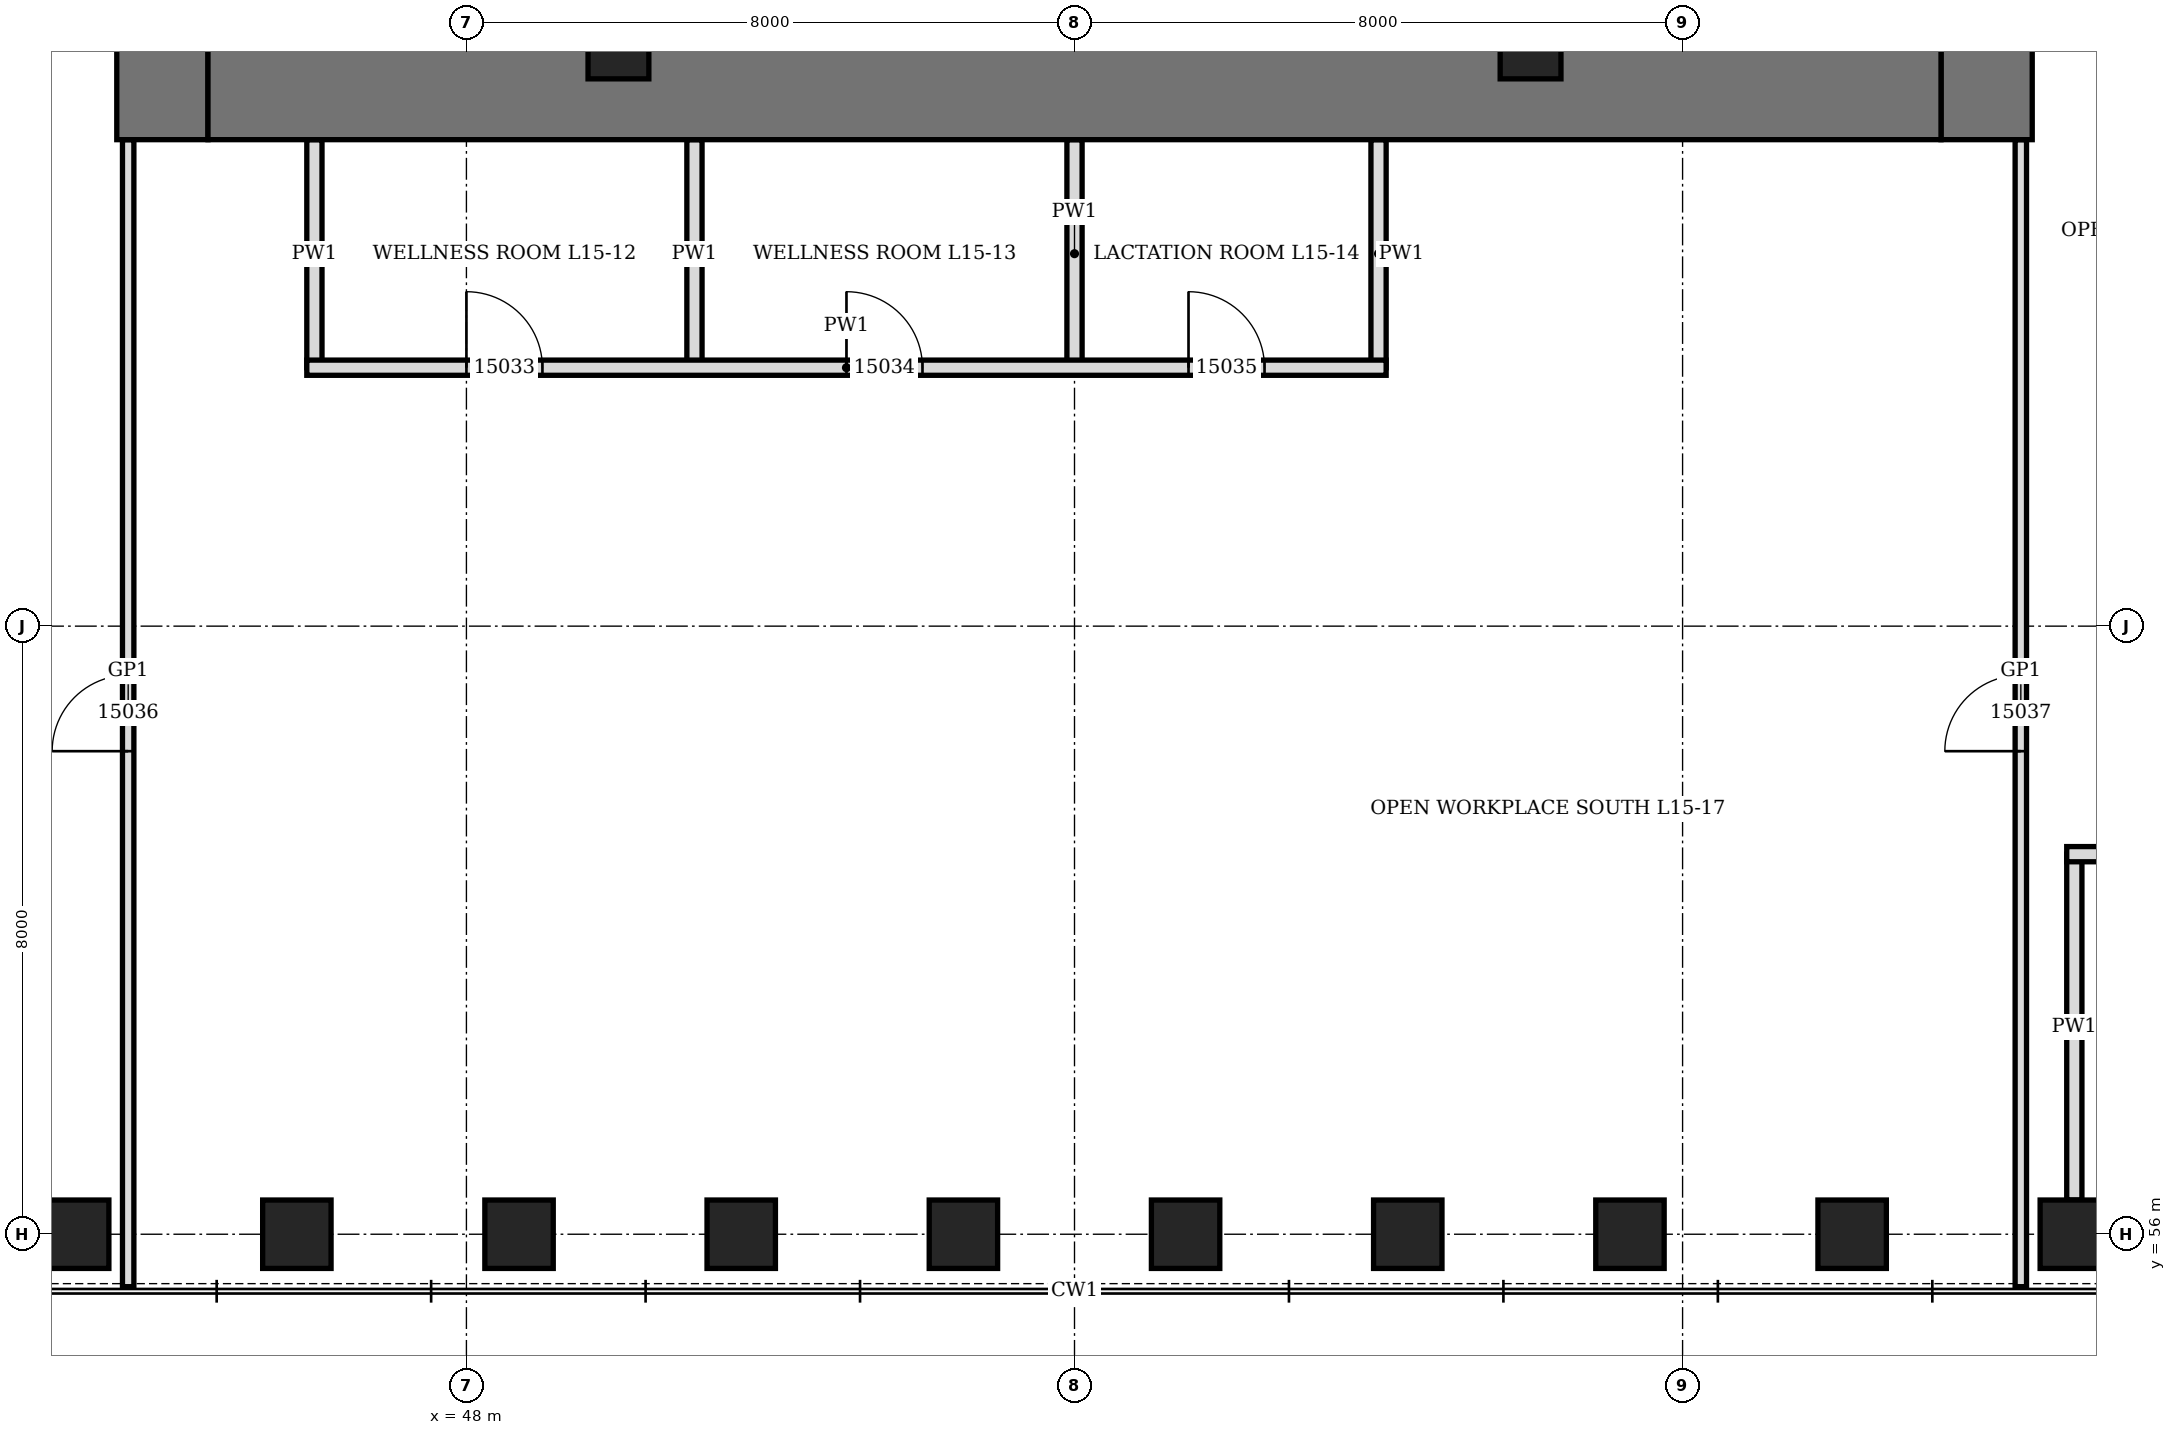
"""IFC4 building model, lengths in metres.
Left out: names, types, materials, properties, quantities, classifications, styles, units other than length and angle.
Written with IfcOpenShell. Run it as: python <this file> out.ifc"""

import sys

from ifc_helpers import new_model, si_unit, direction, frame, frame_2d, origin, origin_2d, place, context, subcontext, project, spatial, rectangle, hollow_rectangle, extrude, element, fill, save


model = new_model("IFC4")
c1 = context("Model", 3, precision=1e-05, world=origin(), true_north=direction((0.0, 1.0)))
c2 = subcontext(c1, "Body", "Model", "MODEL_VIEW")
j1 = project(units=[si_unit("LENGTHUNIT", "METRE"), si_unit("PLANEANGLEUNIT", "RADIAN")], contexts=[c1])
p1 = place(None, origin())
s1 = spatial("IfcSite", under=j1, at=p1, CompositionType="ELEMENT")
p2 = place(p1, origin())
s2 = spatial("IfcBuilding", under=s1, at=p2, CompositionType="ELEMENT")
p3 = place(p2, frame((0.0, 0.0, 72.7)))
s3 = spatial("IfcBuildingStorey", under=s2, at=p3, CompositionType="ELEMENT", Elevation=72.7)
for number, where, z_axis, x_axis in (
    (1, (42.846, 56.0, 0.0), (0.0, 0.0, 1.0), (1.0, 0.0, 0.0)),
    (2, (45.769, 56.0, 0.0), (0.0, 0.0, 1.0), (1.0, 0.0, 0.0)),
    (3, (48.692, 56.0, 0.0), (0.0, 0.0, 1.0), (1.0, 0.0, 0.0)),
    (4, (51.615, 56.0, 0.0), (0.0, 0.0, 1.0), (1.0, 0.0, 0.0)),
    (5, (54.539, 56.0, 0.0), (0.0, 0.0, 1.0), (1.0, 0.0, 0.0)),
    (6, (57.461, 56.0, 0.0), (0.0, 0.0, 1.0), (1.0, 0.0, 0.0)),
    (7, (60.385, 56.0, 0.0), (0.0, 0.0, 1.0), (1.0, 0.0, 0.0)),
    (8, (63.308, 56.0, 0.0), (0.0, 0.0, 1.0), (1.0, 0.0, 0.0)),
    (9, (66.231, 56.0, 0.0), (0.0, 0.0, 1.0), (1.0, 0.0, 0.0)),
    (10, (69.154, 56.0, 0.0), (0.0, 0.0, 1.0), (1.0, 0.0, 0.0)),
):
    element("IfcColumn", number, at=place(p3, frame(where, z_axis=z_axis, x_axis=x_axis)), inside=s3, PredefinedType="COLUMN", context=c2, shape_type="SweptSolid", body=[
        extrude(hollow_rectangle(XDim=0.9, YDim=0.9, WallThickness=0.12, at=origin_2d()), origin(), (0.0, 0.0, 1.0), 4.2),
    ])
p4 = place(p3, frame((44.0, 70.4, 0.0), z_axis=(0.0, 0.0, 1.0), x_axis=(0.0, 1.0, 0.0)))
e11 = element("IfcWall", 11, at=p4, inside=s3, PredefinedType="SHEAR", context=c2, shape_type="SweptSolid", body=[
    extrude(rectangle(XDim=19.2, YDim=1.2, at=frame_2d((9.6, 0.0))), origin(), (0.0, 0.0, 1.0), 4.2),
])
p5 = place(p4, frame((8.6, 0.0, 0.0)))
e12 = element("IfcOpeningElement", 12, at=p5, cuts=e11, PredefinedType="OPENING", context=c2, shape_type="SweptSolid", body=[
    extrude(rectangle(XDim=2.0, YDim=2.4, at=frame_2d((1.0, 1.2))), frame((0.0, 0.61, 0.0), z_axis=(0.0, -1.0, 0.0), x_axis=(1.0, 0.0, 0.0)), (0.0, 0.0, 1.0), 1.22),
])
p6 = place(p3, frame((68.0, 70.4, 0.0), z_axis=(0.0, 0.0, 1.0), x_axis=(0.0, 1.0, 0.0)))
e13 = element("IfcWall", 13, at=p6, inside=s3, PredefinedType="SHEAR", context=c2, shape_type="SweptSolid", body=[
    extrude(rectangle(XDim=19.2, YDim=1.2, at=frame_2d((9.6, 0.0))), origin(), (0.0, 0.0, 1.0), 4.2),
])
p7 = place(p6, frame((8.6, 0.0, 0.0)))
e14 = element("IfcOpeningElement", 14, at=p7, cuts=e13, PredefinedType="OPENING", context=c2, shape_type="SweptSolid", body=[
    extrude(rectangle(XDim=2.0, YDim=2.4, at=frame_2d((1.0, 1.2))), frame((0.0, 0.61, 0.0), z_axis=(0.0, -1.0, 0.0), x_axis=(1.0, 0.0, 0.0)), (0.0, 0.0, 1.0), 1.22),
])
p8 = place(p3, frame((44.6, 71.0, 0.0), z_axis=(0.0, 0.0, 1.0), x_axis=(1.0, 0.0, 0.0)))
e15 = element("IfcWall", 15, at=p8, inside=s3, PredefinedType="SHEAR", context=c2, shape_type="SweptSolid", body=[
    extrude(rectangle(XDim=22.8, YDim=1.2, at=frame_2d((11.4, 0.0))), origin(), (0.0, 0.0, 1.0), 4.2),
])
for number, where, z_axis, x_axis in (
    (16, (50.0, 71.6, 0.0), (0.0, 0.0, 1.0), (1.0, 0.0, 0.0)),
    (17, (62.0, 71.6, 0.0), (0.0, 0.0, 1.0), (1.0, 0.0, 0.0)),
):
    element("IfcColumn", number, at=place(p3, frame(where, z_axis=z_axis, x_axis=x_axis)), inside=s3, PredefinedType="COLUMN", context=c2, shape_type="SweptSolid", body=[
        extrude(hollow_rectangle(XDim=0.8, YDim=0.8, WallThickness=0.1, at=origin_2d()), origin(), (0.0, 0.0, 1.0), 4.2),
    ])
p9 = place(p3, frame((69.154, 56.45, 0.0), z_axis=(0.0, 0.0, 1.0), x_axis=(0.0, 1.0, 0.0)))
e18 = element("IfcWall", 18, at=p9, inside=s3, PredefinedType="PARTITIONING", context=c2, shape_type="SweptSolid", body=[
    extrude(rectangle(XDim=4.55, YDim=0.2, at=frame_2d((2.275, 0.0))), origin(), (0.0, 0.0, 1.0), 3.278),
])
for number, where, z_axis, x_axis in (
    (19, (46.0, 67.4, 0.0), (0.0, 0.0, 1.0), (0.0, 1.0, 0.0)),
    (20, (51.0, 67.4, 0.0), (0.0, 0.0, 1.0), (0.0, 1.0, 0.0)),
    (21, (56.0, 67.4, 0.0), (0.0, 0.0, 1.0), (0.0, 1.0, 0.0)),
    (22, (60.0, 67.4, 0.0), (0.0, 0.0, 1.0), (0.0, 1.0, 0.0)),
):
    element("IfcWall", number, at=place(p3, frame(where, z_axis=z_axis, x_axis=x_axis)), inside=s3, PredefinedType="PARTITIONING", context=c2, shape_type="SweptSolid", body=[
        extrude(rectangle(XDim=3.0, YDim=0.2, at=frame_2d((1.5, 0.0))), origin(), (0.0, 0.0, 1.0), 4.04),
    ])
p10 = place(p3, frame((69.054, 61.0, 0.0), z_axis=(0.0, 0.0, 1.0), x_axis=(1.0, 0.0, 0.0)))
e23 = element("IfcWall", 23, at=p10, inside=s3, PredefinedType="PARTITIONING", context=c2, shape_type="SweptSolid", body=[
    extrude(rectangle(XDim=5.496, YDim=0.2, at=frame_2d((2.748, 0.0))), origin(), (0.0, 0.0, 1.0), 4.04),
])
p11 = place(p10, frame((1.062, 0.0, 0.0)))
e24 = element("IfcOpeningElement", 24, at=p11, cuts=e23, PredefinedType="OPENING", context=c2, shape_type="SweptSolid", body=[
    extrude(rectangle(XDim=1.0, YDim=2.1, at=frame_2d((0.5, 1.05))), frame((0.0, 0.11, 0.0), z_axis=(0.0, -1.0, 0.0), x_axis=(1.0, 0.0, 0.0)), (0.0, 0.0, 1.0), 0.22),
])
p12 = place(p3, frame((45.9, 67.4, 0.0), z_axis=(0.0, 0.0, 1.0), x_axis=(1.0, 0.0, 0.0)))
e25 = element("IfcWall", 25, at=p12, inside=s3, PredefinedType="PARTITIONING", context=c2, shape_type="SweptSolid", body=[
    extrude(rectangle(XDim=14.2, YDim=0.2, at=frame_2d((7.1, 0.0))), origin(), (0.0, 0.0, 1.0), 4.04),
])
p13 = place(p12, frame((2.1, 0.0, 0.0)))
e26 = element("IfcOpeningElement", 26, at=p13, cuts=e25, PredefinedType="OPENING", context=c2, shape_type="SweptSolid", body=[
    extrude(rectangle(XDim=1.0, YDim=2.1, at=frame_2d((0.5, 1.05))), frame((0.0, 0.11, 0.0), z_axis=(0.0, -1.0, 0.0), x_axis=(1.0, 0.0, 0.0)), (0.0, 0.0, 1.0), 0.22),
])
p14 = place(p12, frame((7.1, 0.0, 0.0)))
e27 = element("IfcOpeningElement", 27, at=p14, cuts=e25, PredefinedType="OPENING", context=c2, shape_type="SweptSolid", body=[
    extrude(rectangle(XDim=1.0, YDim=2.1, at=frame_2d((0.5, 1.05))), frame((0.0, 0.11, 0.0), z_axis=(0.0, -1.0, 0.0), x_axis=(1.0, 0.0, 0.0)), (0.0, 0.0, 1.0), 0.22),
])
p15 = place(p12, frame((11.6, 0.0, 0.0)))
e28 = element("IfcOpeningElement", 28, at=p15, cuts=e25, PredefinedType="OPENING", context=c2, shape_type="SweptSolid", body=[
    extrude(rectangle(XDim=1.0, YDim=2.1, at=frame_2d((0.5, 1.05))), frame((0.0, 0.11, 0.0), z_axis=(0.0, -1.0, 0.0), x_axis=(1.0, 0.0, 0.0)), (0.0, 0.0, 1.0), 0.22),
])
p16 = place(p3, frame((43.55, 55.31, 0.0), z_axis=(0.0, 0.0, 1.0), x_axis=(0.0, 1.0, 0.0)))
e29 = element("IfcWall", 29, at=p16, inside=s3, PredefinedType="PARTITIONING", context=c2, shape_type="SweptSolid", body=[
    extrude(rectangle(XDim=15.09, YDim=0.15, at=frame_2d((7.545, 0.0))), origin(), (0.0, 0.0, 1.0), 4.04),
])
p17 = place(p16, frame((7.045, 0.0, 0.0)))
e30 = element("IfcOpeningElement", 30, at=p17, cuts=e29, PredefinedType="OPENING", context=c2, shape_type="SweptSolid", body=[
    extrude(rectangle(XDim=1.0, YDim=2.4, at=frame_2d((0.5, 1.2))), frame((0.0, 0.085, 0.0), z_axis=(0.0, -1.0, 0.0), x_axis=(1.0, 0.0, 0.0)), (0.0, 0.0, 1.0), 0.17),
])
p18 = place(p3, frame((68.45, 55.31, 0.0), z_axis=(0.0, 0.0, 1.0), x_axis=(0.0, 1.0, 0.0)))
e31 = element("IfcWall", 31, at=p18, inside=s3, PredefinedType="PARTITIONING", context=c2, shape_type="SweptSolid", body=[
    extrude(rectangle(XDim=15.09, YDim=0.15, at=frame_2d((7.545, 0.0))), origin(), (0.0, 0.0, 1.0), 4.04),
])
p19 = place(p18, frame((7.045, 0.0, 0.0)))
e32 = element("IfcOpeningElement", 32, at=p19, cuts=e31, PredefinedType="OPENING", context=c2, shape_type="SweptSolid", body=[
    extrude(rectangle(XDim=1.0, YDim=2.4, at=frame_2d((0.5, 1.2))), frame((0.0, 0.085, 0.0), z_axis=(0.0, -1.0, 0.0), x_axis=(1.0, 0.0, 0.0)), (0.0, 0.0, 1.0), 0.17),
])
p20 = place(p13, origin())
e33 = element("IfcDoor", 33, at=p20, inside=s3, OperationType="SINGLE_SWING_LEFT", PredefinedType="DOOR", context=c2, shape_type="SweptSolid", body=[
    extrude(rectangle(XDim=1.0, YDim=2.1, at=frame_2d((0.5, 1.05))), frame((0.0, 0.1, 0.0), z_axis=(0.0, -1.0, 0.0), x_axis=(1.0, 0.0, 0.0)), (0.0, 0.0, 1.0), 0.199),
])
fill(e26, e33)
p21 = place(p14, origin())
e34 = element("IfcDoor", 34, at=p21, inside=s3, OperationType="SINGLE_SWING_LEFT", PredefinedType="DOOR", context=c2, shape_type="SweptSolid", body=[
    extrude(rectangle(XDim=1.0, YDim=2.1, at=frame_2d((0.5, 1.05))), frame((0.0, 0.1, 0.0), z_axis=(0.0, -1.0, 0.0), x_axis=(1.0, 0.0, 0.0)), (0.0, 0.0, 1.0), 0.199),
])
fill(e27, e34)
p22 = place(p15, origin())
e35 = element("IfcDoor", 35, at=p22, inside=s3, OperationType="SINGLE_SWING_LEFT", PredefinedType="DOOR", context=c2, shape_type="SweptSolid", body=[
    extrude(rectangle(XDim=1.0, YDim=2.1, at=frame_2d((0.5, 1.05))), frame((0.0, 0.1, 0.0), z_axis=(0.0, -1.0, 0.0), x_axis=(1.0, 0.0, 0.0)), (0.0, 0.0, 1.0), 0.199),
])
fill(e28, e35)
p23 = place(p17, origin())
e36 = element("IfcDoor", 36, at=p23, inside=s3, OperationType="SINGLE_SWING_RIGHT", PredefinedType="DOOR", context=c2, shape_type="SweptSolid", body=[
    extrude(rectangle(XDim=1.0, YDim=2.4, at=frame_2d((0.5, 1.2))), frame((0.0, 0.075, 0.0), z_axis=(0.0, -1.0, 0.0), x_axis=(1.0, 0.0, 0.0)), (0.0, 0.0, 1.0), 0.149),
])
fill(e30, e36)
p24 = place(p19, origin())
e37 = element("IfcDoor", 37, at=p24, inside=s3, OperationType="SINGLE_SWING_RIGHT", PredefinedType="DOOR", context=c2, shape_type="SweptSolid", body=[
    extrude(rectangle(XDim=1.0, YDim=2.4, at=frame_2d((0.5, 1.2))), frame((0.0, 0.075, 0.0), z_axis=(0.0, -1.0, 0.0), x_axis=(1.0, 0.0, 0.0)), (0.0, 0.0, 1.0), 0.149),
])
fill(e32, e37)
save(model, sys.argv[1])
